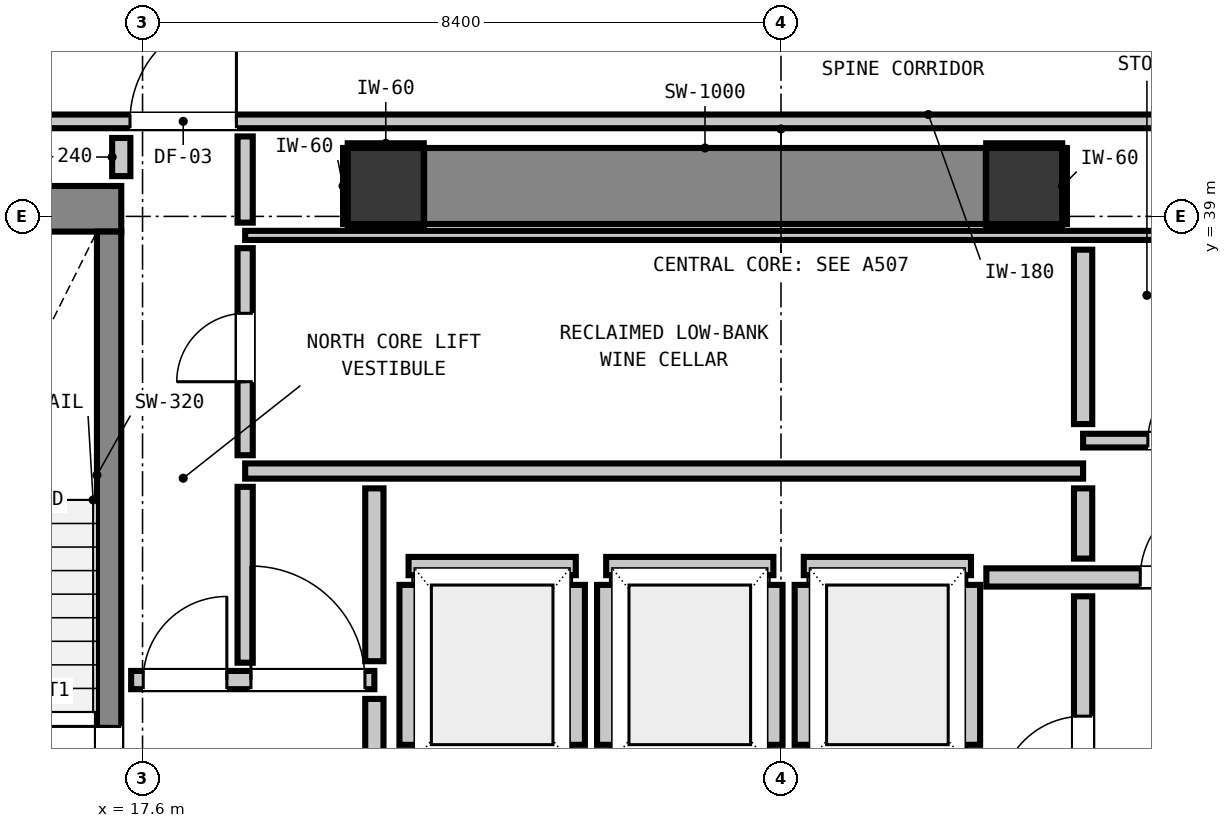
"""IFC4 building model, lengths in metres.
Left out: names, types, materials, properties, quantities, classifications, styles, units other than length and angle.
Written with IfcOpenShell. Run it as: python <this file> out.ifc"""

import sys

from ifc_helpers import new_model, si_unit, direction, frame, frame_2d, origin, origin_2d, place, context, subcontext, project, spatial, rectangle, extrude, element, fill, save


model = new_model("IFC4")
c1 = context("Model", 3, precision=1e-05, world=origin(), true_north=direction((0.0, 1.0)))
c2 = subcontext(c1, "Body", "Model", "MODEL_VIEW")
j1 = project(units=[si_unit("LENGTHUNIT", "METRE"), si_unit("PLANEANGLEUNIT", "RADIAN")], contexts=[c1])
p1 = place(None, origin())
s1 = spatial("IfcSite", under=j1, at=p1, CompositionType="ELEMENT")
p2 = place(p1, origin())
s2 = spatial("IfcBuilding", under=s1, at=p2, CompositionType="ELEMENT")
p3 = place(p2, frame((0.0, 0.0, 132.64)))
s3 = spatial("IfcBuildingStorey", under=s2, at=p3, CompositionType="ELEMENT", Elevation=132.64)
for number, where, z_axis, x_axis in (
    (1, (20.8, 39.4, 0.0), (0.0, 0.0, 1.0), (1.0, 0.0, 0.0)),
    (2, (29.2, 39.4, 0.0), (0.0, 0.0, 1.0), (1.0, 0.0, 0.0)),
):
    element("IfcColumn", number, at=place(p3, frame(where, z_axis=z_axis, x_axis=x_axis)), inside=s3, PredefinedType="COLUMN", context=c2, shape_type="SweptSolid", body=[
        extrude(rectangle(XDim=1.0, YDim=1.0, at=origin_2d()), origin(), (0.0, 0.0, 1.0), 3.32),
    ])
p4 = place(p3, frame((13.24, 39.1, 0.0), z_axis=(0.0, 0.0, 1.0), x_axis=(1.0, 0.0, 0.0)))
e3 = element("IfcWall", 3, at=p4, inside=s3, PredefinedType="SHEAR", context=c2, shape_type="SweptSolid", body=[
    extrude(rectangle(XDim=4.08, YDim=0.6, at=frame_2d((2.04, 0.0))), origin(), (0.0, 0.0, 1.0), 3.32),
])
p5 = place(p3, frame((21.305, 39.4, 0.0), z_axis=(0.0, 0.0, 1.0), x_axis=(1.0, 0.0, 0.0)))
e4 = element("IfcWall", 4, at=p5, inside=s3, PredefinedType="SHEAR", context=c2, shape_type="SweptSolid", body=[
    extrude(rectangle(XDim=7.39, YDim=1.0, at=frame_2d((3.695, 0.0))), origin(), (0.0, 0.0, 1.0), 3.32),
])
p6 = place(p3, frame((17.16, 31.0, 0.0), z_axis=(0.0, 0.0, 1.0), x_axis=(0.0, 1.0, 0.0)))
e5 = element("IfcWall", 5, at=p6, inside=s3, PredefinedType="SHEAR", context=c2, shape_type="SweptSolid", body=[
    extrude(rectangle(XDim=7.8, YDim=0.32, at=frame_2d((3.9, 0.0))), origin(), (0.0, 0.0, 1.0), 3.32),
])
p7 = place(p6, frame((0.19, 0.0, 0.0)))
e6 = element("IfcOpeningElement", 6, at=p7, cuts=e5, PredefinedType="OPENING", context=c2, shape_type="SweptSolid", body=[
    extrude(rectangle(XDim=1.1, YDim=2.15, at=frame_2d((0.55, 1.075))), frame((0.0, 0.17, 0.0), z_axis=(0.0, -1.0, 0.0), x_axis=(1.0, 0.0, 0.0)), (0.0, 0.0, 1.0), 0.34),
])
p8 = place(p3, frame((21.1, 34.4, 0.0), z_axis=(0.0, 0.0, 1.0), x_axis=(1.0, 0.0, 0.0)))
e7 = element("IfcWall", 7, at=p8, inside=s3, PredefinedType="PARTITIONING", context=c2, shape_type="SweptSolid", body=[
    extrude(rectangle(XDim=2.2, YDim=0.24, at=frame_2d((1.1, 0.0))), origin(), (0.0, 0.0, 1.0), 3.08),
])
p9 = place(p3, frame((21.1, 32.048, 0.0), z_axis=(0.0, 0.0, 1.0), x_axis=(0.0, 1.0, 0.0)))
e8 = element("IfcWall", 8, at=p9, inside=s3, PredefinedType="PARTITIONING", context=c2, shape_type="SweptSolid", body=[
    extrude(rectangle(XDim=2.104, YDim=0.24, at=frame_2d((1.052, 0.0))), origin(), (0.0, 0.0, 1.0), 2.315),
])
p10 = place(p3, frame((23.3, 32.048, 0.0), z_axis=(0.0, 0.0, 1.0), x_axis=(0.0, 1.0, 0.0)))
e9 = element("IfcWall", 9, at=p10, inside=s3, PredefinedType="PARTITIONING", context=c2, shape_type="SweptSolid", body=[
    extrude(rectangle(XDim=2.104, YDim=0.24, at=frame_2d((1.052, 0.0))), origin(), (0.0, 0.0, 1.0), 3.08),
])
p11 = place(p3, frame((23.7, 34.4, 0.0), z_axis=(0.0, 0.0, 1.0), x_axis=(1.0, 0.0, 0.0)))
e10 = element("IfcWall", 10, at=p11, inside=s3, PredefinedType="PARTITIONING", context=c2, shape_type="SweptSolid", body=[
    extrude(rectangle(XDim=2.2, YDim=0.24, at=frame_2d((1.1, 0.0))), origin(), (0.0, 0.0, 1.0), 3.08),
])
for number, where, z_axis, x_axis in (
    (11, (23.7, 32.048, 0.0), (0.0, 0.0, 1.0), (0.0, 1.0, 0.0)),
    (12, (25.9, 32.048, 0.0), (0.0, 0.0, 1.0), (0.0, 1.0, 0.0)),
):
    element("IfcWall", number, at=place(p3, frame(where, z_axis=z_axis, x_axis=x_axis)), inside=s3, PredefinedType="PARTITIONING", context=c2, shape_type="SweptSolid", body=[
        extrude(rectangle(XDim=2.104, YDim=0.24, at=frame_2d((1.052, 0.0))), origin(), (0.0, 0.0, 1.0), 3.08),
    ])
p12 = place(p3, frame((26.3, 34.4, 0.0), z_axis=(0.0, 0.0, 1.0), x_axis=(1.0, 0.0, 0.0)))
e13 = element("IfcWall", 13, at=p12, inside=s3, PredefinedType="PARTITIONING", context=c2, shape_type="SweptSolid", body=[
    extrude(rectangle(XDim=2.2, YDim=0.24, at=frame_2d((1.1, 0.0))), origin(), (0.0, 0.0, 1.0), 3.08),
])
for number, where, z_axis, x_axis in (
    (14, (26.3, 32.048, 0.0), (0.0, 0.0, 1.0), (0.0, 1.0, 0.0)),
    (15, (28.5, 32.048, 0.0), (0.0, 0.0, 1.0), (0.0, 1.0, 0.0)),
):
    element("IfcWall", number, at=place(p3, frame(where, z_axis=z_axis, x_axis=x_axis)), inside=s3, PredefinedType="PARTITIONING", context=c2, shape_type="SweptSolid", body=[
        extrude(rectangle(XDim=2.104, YDim=0.24, at=frame_2d((1.052, 0.0))), origin(), (0.0, 0.0, 1.0), 3.08),
    ])
p13 = place(p3, frame((17.45, 32.9, 0.0), z_axis=(0.0, 0.0, 1.0), x_axis=(1.0, 0.0, 0.0)))
e16 = element("IfcWall", 16, at=p13, inside=s3, PredefinedType="PARTITIONING", context=c2, shape_type="SweptSolid", body=[
    extrude(rectangle(XDim=3.2, YDim=0.24, at=frame_2d((1.6, 0.0))), origin(), (0.0, 0.0, 1.0), 3.08),
])
p14 = place(p13, frame((0.159, 0.0, 0.0)))
e17 = element("IfcOpeningElement", 17, at=p14, cuts=e16, PredefinedType="OPENING", context=c2, shape_type="SweptSolid", body=[
    extrude(rectangle(XDim=1.1, YDim=2.15, at=frame_2d((0.55, 1.075))), frame((0.0, 0.13, 0.0), z_axis=(0.0, -1.0, 0.0), x_axis=(1.0, 0.0, 0.0)), (0.0, 0.0, 1.0), 0.26),
])
p15 = place(p13, frame((1.576, 0.0, 0.0)))
e18 = element("IfcOpeningElement", 18, at=p15, cuts=e16, PredefinedType="OPENING", context=c2, shape_type="SweptSolid", body=[
    extrude(rectangle(XDim=1.5, YDim=2.15, at=frame_2d((0.75, 1.075))), frame((0.0, 0.13, 0.0), z_axis=(0.0, -1.0, 0.0), x_axis=(1.0, 0.0, 0.0)), (0.0, 0.0, 1.0), 0.26),
])
p16 = place(p3, frame((28.702, 34.25, 0.0), z_axis=(0.0, 0.0, 1.0), x_axis=(1.0, 0.0, 0.0)))
e19 = element("IfcWall", 19, at=p16, inside=s3, PredefinedType="PARTITIONING", context=c2, shape_type="SweptSolid", body=[
    extrude(rectangle(XDim=3.748, YDim=0.24, at=frame_2d((1.874, 0.0))), origin(), (0.0, 0.0, 1.0), 3.08),
])
p17 = place(p16, frame((2.025, 0.0, 0.0)))
e20 = element("IfcOpeningElement", 20, at=p17, cuts=e19, PredefinedType="OPENING", context=c2, shape_type="SweptSolid", body=[
    extrude(rectangle(XDim=1.1, YDim=2.15, at=frame_2d((0.55, 1.075))), frame((0.0, 0.13, 0.0), z_axis=(0.0, -1.0, 0.0), x_axis=(1.0, 0.0, 0.0)), (0.0, 0.0, 1.0), 0.26),
])
p18 = place(p3, frame((18.95, 35.65, 0.0), z_axis=(0.0, 0.0, 1.0), x_axis=(1.0, 0.0, 0.0)))
e21 = element("IfcWall", 21, at=p18, inside=s3, PredefinedType="PARTITIONING", context=c2, shape_type="SweptSolid", body=[
    extrude(rectangle(XDim=11.025, YDim=0.2, at=frame_2d((5.513, 0.0))), origin(), (0.0, 0.0, 1.0), 3.08),
])
p19 = place(p3, frame((29.975, 36.05, 0.0), z_axis=(0.0, 0.0, 1.0), x_axis=(1.0, 0.0, 0.0)))
e22 = element("IfcWall", 22, at=p19, inside=s3, PredefinedType="PARTITIONING", context=c2, shape_type="SweptSolid", body=[
    extrude(rectangle(XDim=2.505, YDim=0.18, at=frame_2d((1.252, 0.0))), origin(), (0.0, 0.0, 1.0), 3.08),
])
p20 = place(p19, frame((0.852, 0.0, 0.0)))
e23 = element("IfcOpeningElement", 23, at=p20, cuts=e22, PredefinedType="OPENING", context=c2, shape_type="SweptSolid", body=[
    extrude(rectangle(XDim=0.9, YDim=2.1, at=frame_2d((0.45, 1.05))), frame((0.0, 0.1, 0.0), z_axis=(0.0, -1.0, 0.0), x_axis=(1.0, 0.0, 0.0)), (0.0, 0.0, 1.0), 0.2),
])
p21 = place(p3, frame((9.407, 40.25, 0.0), z_axis=(0.0, 0.0, 1.0), x_axis=(1.0, 0.0, 0.0)))
e24 = element("IfcWall", 24, at=p21, inside=s3, PredefinedType="PARTITIONING", context=c2, shape_type="SweptSolid", body=[
    extrude(rectangle(XDim=27.536, YDim=0.18, at=frame_2d((13.768, 0.0))), origin(), (0.0, 0.0, 1.0), 3.08),
])
p22 = place(p21, frame((8.028, 0.0, 0.0)))
e25 = element("IfcOpeningElement", 25, at=p22, cuts=e24, PredefinedType="OPENING", context=c2, shape_type="SweptSolid", body=[
    extrude(rectangle(XDim=1.4, YDim=2.15, at=frame_2d((0.7, 1.075))), frame((0.0, 0.1, 0.0), z_axis=(0.0, -1.0, 0.0), x_axis=(1.0, 0.0, 0.0)), (0.0, 0.0, 1.0), 0.2),
])
p23 = place(p21, frame((1.192, 0.0, 0.0)))
e26 = element("IfcOpeningElement", 26, at=p23, cuts=e24, PredefinedType="OPENING", context=c2, shape_type="SweptSolid", body=[
    extrude(rectangle(XDim=1.4, YDim=2.15, at=frame_2d((0.7, 1.075))), frame((0.0, 0.1, 0.0), z_axis=(0.0, -1.0, 0.0), x_axis=(1.0, 0.0, 0.0)), (0.0, 0.0, 1.0), 0.2),
])
p24 = place(p3, frame((18.95, 38.75, 0.0), z_axis=(0.0, 0.0, 1.0), x_axis=(1.0, 0.0, 0.0)))
e27 = element("IfcWall", 27, at=p24, inside=s3, PredefinedType="PARTITIONING", context=c2, shape_type="SweptSolid", body=[
    extrude(rectangle(XDim=13.56, YDim=0.12, at=frame_2d((6.78, 0.0))), origin(), (0.0, 0.0, 1.0), 3.08),
])
p25 = place(p3, frame((17.32, 39.53, 0.0), z_axis=(0.0, 0.0, 1.0), x_axis=(0.0, 1.0, 0.0)))
e28 = element("IfcWall", 28, at=p25, inside=s3, PredefinedType="PARTITIONING", context=c2, shape_type="SweptSolid", body=[
    extrude(rectangle(XDim=0.502, YDim=0.24, at=frame_2d((0.251, 0.0))), origin(), (0.0, 0.0, 1.0), 3.08),
])
p26 = place(p3, frame((20.65, 31.868, 0.0), z_axis=(0.0, 0.0, 1.0), x_axis=(0.0, 1.0, 0.0)))
e29 = element("IfcWall", 29, at=p26, inside=s3, PredefinedType="PARTITIONING", context=c2, shape_type="SweptSolid", body=[
    extrude(rectangle(XDim=0.784, YDim=0.24, at=frame_2d((0.392, 0.0))), origin(), (0.0, 0.0, 1.0), 2.315),
])
p27 = place(p3, frame((20.65, 33.148, 0.0), z_axis=(0.0, 0.0, 1.0), x_axis=(0.0, 1.0, 0.0)))
e30 = element("IfcWall", 30, at=p27, inside=s3, PredefinedType="PARTITIONING", context=c2, shape_type="SweptSolid", body=[
    extrude(rectangle(XDim=2.274, YDim=0.24, at=frame_2d((1.137, 0.0))), origin(), (0.0, 0.0, 1.0), 2.315),
])
p28 = place(p3, frame((29.975, 29.768, 0.0), z_axis=(0.0, 0.0, 1.0), x_axis=(0.0, 1.0, 0.0)))
e31 = element("IfcWall", 31, at=p28, inside=s3, PredefinedType="PARTITIONING", context=c2, shape_type="SweptSolid", body=[
    extrude(rectangle(XDim=4.234, YDim=0.24, at=frame_2d((2.117, 0.0))), origin(), (0.0, 0.0, 1.0), 3.08),
])
p29 = place(p28, frame((1.557, 0.0, 0.0)))
e32 = element("IfcOpeningElement", 32, at=p29, cuts=e31, PredefinedType="OPENING", context=c2, shape_type="SweptSolid", body=[
    extrude(rectangle(XDim=1.1, YDim=2.15, at=frame_2d((0.55, 1.075))), frame((0.0, 0.13, 0.0), z_axis=(0.0, -1.0, 0.0), x_axis=(1.0, 0.0, 0.0)), (0.0, 0.0, 1.0), 0.26),
])
p30 = place(p3, frame((29.975, 34.498, 0.0), z_axis=(0.0, 0.0, 1.0), x_axis=(0.0, 1.0, 0.0)))
e33 = element("IfcWall", 33, at=p30, inside=s3, PredefinedType="PARTITIONING", context=c2, shape_type="SweptSolid", body=[
    extrude(rectangle(XDim=0.924, YDim=0.24, at=frame_2d((0.462, 0.0))), origin(), (0.0, 0.0, 1.0), 3.08),
])
p31 = place(p3, frame((29.975, 36.268, 0.0), z_axis=(0.0, 0.0, 1.0), x_axis=(0.0, 1.0, 0.0)))
e34 = element("IfcWall", 34, at=p31, inside=s3, PredefinedType="PARTITIONING", context=c2, shape_type="SweptSolid", body=[
    extrude(rectangle(XDim=2.294, YDim=0.24, at=frame_2d((1.147, 0.0))), origin(), (0.0, 0.0, 1.0), 3.08),
])
p32 = place(p3, frame((18.95, 33.128, 0.0), z_axis=(0.0, 0.0, 1.0), x_axis=(0.0, 1.0, 0.0)))
e35 = element("IfcWall", 35, at=p32, inside=s3, PredefinedType="PARTITIONING", context=c2, shape_type="SweptSolid", body=[
    extrude(rectangle(XDim=2.314, YDim=0.2, at=frame_2d((1.157, 0.0))), origin(), (0.0, 0.0, 1.0), 3.08),
])
p33 = place(p3, frame((18.95, 35.858, 0.0), z_axis=(0.0, 0.0, 1.0), x_axis=(0.0, 1.0, 0.0)))
e36 = element("IfcWall", 36, at=p33, inside=s3, PredefinedType="PARTITIONING", context=c2, shape_type="SweptSolid", body=[
    extrude(rectangle(XDim=2.724, YDim=0.2, at=frame_2d((1.362, 0.0))), origin(), (0.0, 0.0, 1.0), 3.08),
])
p34 = place(p33, frame((0.967, 0.0, 0.0)))
e37 = element("IfcOpeningElement", 37, at=p34, cuts=e36, PredefinedType="OPENING", context=c2, shape_type="SweptSolid", body=[
    extrude(rectangle(XDim=0.9, YDim=2.1, at=frame_2d((0.45, 1.05))), frame((0.0, 0.11, 0.0), z_axis=(0.0, -1.0, 0.0), x_axis=(1.0, 0.0, 0.0)), (0.0, 0.0, 1.0), 0.22),
])
p35 = place(p3, frame((18.95, 38.918, 0.0), z_axis=(0.0, 0.0, 1.0), x_axis=(0.0, 1.0, 0.0)))
e38 = element("IfcWall", 38, at=p35, inside=s3, PredefinedType="PARTITIONING", context=c2, shape_type="SweptSolid", body=[
    extrude(rectangle(XDim=1.134, YDim=0.2, at=frame_2d((0.567, 0.0))), origin(), (0.0, 0.0, 1.0), 3.08),
])
for number, where, z_axis, x_axis in (
    (39, (20.3, 38.868, 0.0), (0.0, 0.0, 1.0), (1.0, 0.0, 0.0)),
    (40, (20.3, 39.932, 0.0), (0.0, 0.0, 1.0), (1.0, 0.0, 0.0)),
    (41, (20.268, 38.9, 0.0), (0.0, 0.0, 1.0), (0.0, 1.0, 0.0)),
    (42, (28.7, 38.868, 0.0), (0.0, 0.0, 1.0), (1.0, 0.0, 0.0)),
    (43, (28.7, 39.932, 0.0), (0.0, 0.0, 1.0), (1.0, 0.0, 0.0)),
    (44, (29.732, 38.9, 0.0), (0.0, 0.0, 1.0), (0.0, 1.0, 0.0)),
):
    element("IfcWall", number, at=place(p3, frame(where, z_axis=z_axis, x_axis=x_axis)), inside=s3, PredefinedType="PARTITIONING", context=c2, shape_type="SweptSolid", body=[
        extrude(rectangle(XDim=1.0, YDim=0.06, at=frame_2d((0.5, 0.0))), origin(), (0.0, 0.0, 1.0), 1.45),
    ])
p36 = place(p7, origin())
e45 = element("IfcDoor", 45, at=p36, inside=s3, OperationType="SINGLE_SWING_RIGHT", PredefinedType="DOOR", context=c2, shape_type="SweptSolid", body=[
    extrude(rectangle(XDim=1.1, YDim=2.15, at=frame_2d((0.55, 1.075))), frame((0.0, 0.025, 0.0), z_axis=(0.0, -1.0, 0.0), x_axis=(1.0, 0.0, 0.0)), (0.0, 0.0, 1.0), 0.05),
])
fill(e6, e45)
p37 = place(p14, origin())
e46 = element("IfcDoor", 46, at=p37, inside=s3, OperationType="SINGLE_SWING_RIGHT", PredefinedType="DOOR", context=c2, shape_type="SweptSolid", body=[
    extrude(rectangle(XDim=1.1, YDim=2.15, at=frame_2d((0.55, 1.075))), frame((0.0, 0.025, 0.0), z_axis=(0.0, -1.0, 0.0), x_axis=(1.0, 0.0, 0.0)), (0.0, 0.0, 1.0), 0.05),
])
fill(e17, e46)
p38 = place(p29, origin())
e47 = element("IfcDoor", 47, at=p38, inside=s3, OperationType="SINGLE_SWING_LEFT", PredefinedType="DOOR", context=c2, shape_type="SweptSolid", body=[
    extrude(rectangle(XDim=1.1, YDim=2.15, at=frame_2d((0.55, 1.075))), frame((0.0, 0.025, 0.0), z_axis=(0.0, -1.0, 0.0), x_axis=(1.0, 0.0, 0.0)), (0.0, 0.0, 1.0), 0.05),
])
fill(e32, e47)
p39 = place(p17, origin())
e48 = element("IfcDoor", 48, at=p39, inside=s3, OperationType="SINGLE_SWING_RIGHT", PredefinedType="DOOR", context=c2, shape_type="SweptSolid", body=[
    extrude(rectangle(XDim=1.1, YDim=2.15, at=frame_2d((0.55, 1.075))), frame((0.0, 0.025, 0.0), z_axis=(0.0, -1.0, 0.0), x_axis=(1.0, 0.0, 0.0)), (0.0, 0.0, 1.0), 0.05),
])
fill(e20, e48)
p40 = place(p22, origin())
e49 = element("IfcDoor", 49, at=p40, inside=s3, OperationType="SINGLE_SWING_RIGHT", PredefinedType="DOOR", context=c2, shape_type="SweptSolid", body=[
    extrude(rectangle(XDim=1.4, YDim=2.15, at=frame_2d((0.7, 1.075))), frame((0.0, 0.025, 0.0), z_axis=(0.0, -1.0, 0.0), x_axis=(1.0, 0.0, 0.0)), (0.0, 0.0, 1.0), 0.05),
])
fill(e25, e49)
p41 = place(p15, origin())
e50 = element("IfcDoor", 50, at=p41, inside=s3, OperationType="SINGLE_SWING_LEFT", PredefinedType="DOOR", context=c2, shape_type="SweptSolid", body=[
    extrude(rectangle(XDim=1.5, YDim=2.15, at=frame_2d((0.75, 1.075))), frame((0.0, 0.025, 0.0), z_axis=(0.0, -1.0, 0.0), x_axis=(1.0, 0.0, 0.0)), (0.0, 0.0, 1.0), 0.05),
])
fill(e18, e50)
p42 = place(p20, origin())
e51 = element("IfcDoor", 51, at=p42, inside=s3, OperationType="SINGLE_SWING_RIGHT", PredefinedType="DOOR", context=c2, shape_type="SweptSolid", body=[
    extrude(rectangle(XDim=0.9, YDim=2.1, at=frame_2d((0.45, 1.05))), frame((0.0, 0.025, 0.0), z_axis=(0.0, -1.0, 0.0), x_axis=(1.0, 0.0, 0.0)), (0.0, 0.0, 1.0), 0.05),
])
fill(e23, e51)
p43 = place(p34, origin())
e52 = element("IfcDoor", 52, at=p43, inside=s3, OperationType="SINGLE_SWING_LEFT", PredefinedType="DOOR", context=c2, shape_type="SweptSolid", body=[
    extrude(rectangle(XDim=0.9, YDim=2.1, at=frame_2d((0.45, 1.05))), frame((0.0, 0.025, 0.0), z_axis=(0.0, -1.0, 0.0), x_axis=(1.0, 0.0, 0.0)), (0.0, 0.0, 1.0), 0.05),
])
fill(e37, e52)
save(model, sys.argv[1])
